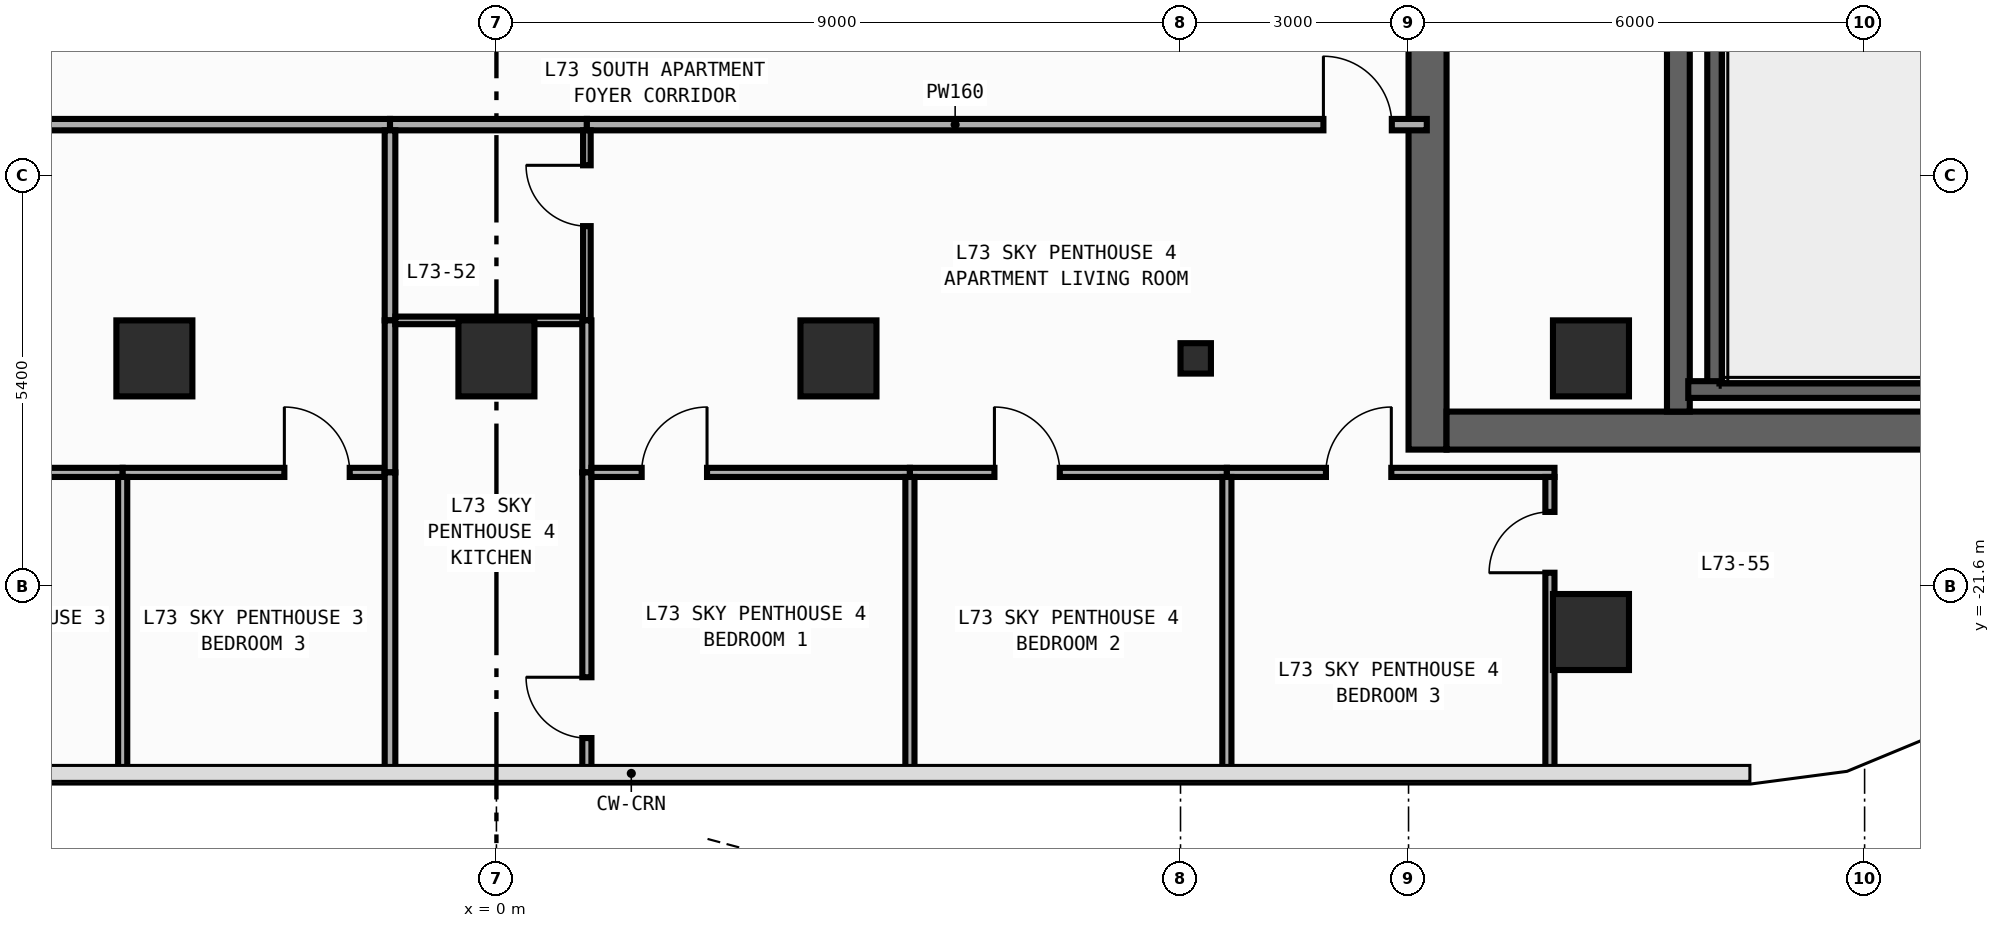
"""IFC4 building model, lengths in metres.
Left out: names, types, materials, properties, quantities, classifications, styles, units other than length and angle.
Written with IfcOpenShell. Run it as: python <this file> out.ifc"""

import sys

from ifc_helpers import new_model, si_unit, direction, frame, frame_2d, origin, origin_2d, place, context, subcontext, project, spatial, rectangle, circle, i_section, extrude, element, fill, save


model = new_model("IFC4")
c1 = context("Model", 3, precision=1e-05, world=origin(), true_north=direction((0.0, 1.0)))
c2 = subcontext(c1, "Body", "Model", "MODEL_VIEW")
j1 = project(units=[si_unit("LENGTHUNIT", "METRE"), si_unit("PLANEANGLEUNIT", "RADIAN")], contexts=[c1])
p1 = place(None, origin())
s1 = spatial("IfcSite", under=j1, at=p1, CompositionType="ELEMENT")
p2 = place(p1, origin())
s2 = spatial("IfcBuilding", under=s1, at=p2, CompositionType="ELEMENT")
p3 = place(p2, frame((0.0, 0.0, 304.2)))
s3 = spatial("IfcBuildingStorey", under=s2, at=p3, CompositionType="ELEMENT", Elevation=304.2)
p4 = place(p3, frame((12.25, -19.8, 0.0), z_axis=(0.0, 0.0, 1.0), x_axis=(0.0, 1.0, 0.0)))
e1 = element("IfcWall", 1, at=p4, inside=s3, PredefinedType="SHEAR", context=c2, shape_type="SweptSolid", body=[
    extrude(rectangle(XDim=27.0, YDim=0.5, at=frame_2d((13.5, 0.0))), origin(), (0.0, 0.0, 1.0), 3.54),
])
p5 = place(p4, frame((23.05, 0.0, 0.0)))
e2 = element("IfcOpeningElement", 2, at=p5, cuts=e1, PredefinedType="OPENING", context=c2, shape_type="SweptSolid", body=[
    extrude(rectangle(XDim=1.1, YDim=2.2, at=frame_2d((0.55, 1.1))), frame((0.0, 0.26, 0.0), z_axis=(0.0, -1.0, 0.0), x_axis=(1.0, 0.0, 0.0)), (0.0, 0.0, 1.0), 0.52),
])
p6 = place(p4, frame((19.85, 0.0, 0.0)))
e3 = element("IfcOpeningElement", 3, at=p6, cuts=e1, PredefinedType="OPENING", context=c2, shape_type="SweptSolid", body=[
    extrude(rectangle(XDim=1.1, YDim=2.2, at=frame_2d((0.55, 1.1))), frame((0.0, 0.26, 0.0), z_axis=(0.0, -1.0, 0.0), x_axis=(1.0, 0.0, 0.0)), (0.0, 0.0, 1.0), 0.52),
])
p7 = place(p4, frame((16.65, 0.0, 0.0)))
e4 = element("IfcOpeningElement", 4, at=p7, cuts=e1, PredefinedType="OPENING", context=c2, shape_type="SweptSolid", body=[
    extrude(rectangle(XDim=1.1, YDim=2.2, at=frame_2d((0.55, 1.1))), frame((0.0, 0.26, 0.0), z_axis=(0.0, -1.0, 0.0), x_axis=(1.0, 0.0, 0.0)), (0.0, 0.0, 1.0), 0.52),
])
p8 = place(p4, frame((10.175, 0.0, 0.0)))
e5 = element("IfcOpeningElement", 5, at=p8, cuts=e1, PredefinedType="OPENING", context=c2, shape_type="SweptSolid", body=[
    extrude(rectangle(XDim=0.85, YDim=2.1, at=frame_2d((0.425, 1.05))), frame((0.0, 0.26, 0.0), z_axis=(0.0, -1.0, 0.0), x_axis=(1.0, 0.0, 0.0)), (0.0, 0.0, 1.0), 0.52),
])
p9 = place(p4, frame((12.725, 0.0, 0.0)))
e6 = element("IfcOpeningElement", 6, at=p9, cuts=e1, PredefinedType="OPENING", context=c2, shape_type="SweptSolid", body=[
    extrude(rectangle(XDim=1.15, YDim=2.2, at=frame_2d((0.575, 1.1))), frame((0.0, 0.26, 0.0), z_axis=(0.0, -1.0, 0.0), x_axis=(1.0, 0.0, 0.0)), (0.0, 0.0, 1.0), 0.52),
])
p10 = place(p4, frame((25.125, 0.0, 0.0)))
e7 = element("IfcOpeningElement", 7, at=p10, cuts=e1, PredefinedType="OPENING", context=c2, shape_type="SweptSolid", body=[
    extrude(rectangle(XDim=0.85, YDim=2.1, at=frame_2d((0.425, 1.05))), frame((0.0, 0.26, 0.0), z_axis=(0.0, -1.0, 0.0), x_axis=(1.0, 0.0, 0.0)), (0.0, 0.0, 1.0), 0.52),
])
p11 = place(p3, frame((12.5, -19.55, 0.0), z_axis=(0.0, 0.0, 1.0), x_axis=(1.0, 0.0, 0.0)))
e8 = element("IfcWall", 8, at=p11, inside=s3, PredefinedType="SHEAR", context=c2, shape_type="SweptSolid", body=[
    extrude(rectangle(XDim=7.4, YDim=0.5, at=frame_2d((3.7, 0.0))), origin(), (0.0, 0.0, 1.0), 3.54),
])
p12 = place(p3, frame((15.55, -19.3, 0.0), z_axis=(0.0, 0.0, 1.0), x_axis=(0.0, 1.0, 0.0)))
e9 = element("IfcWall", 9, at=p12, inside=s3, PredefinedType="SHEAR", context=c2, shape_type="SweptSolid", body=[
    extrude(rectangle(XDim=26.0, YDim=0.3, at=frame_2d((13.0, 0.0))), origin(), (0.0, 0.0, 1.0), 3.54),
])
p13 = place(p12, frame((12.225, 0.0, 0.0)))
e10 = element("IfcOpeningElement", 10, at=p13, cuts=e9, PredefinedType="OPENING", context=c2, shape_type="SweptSolid", body=[
    extrude(rectangle(XDim=1.15, YDim=2.2, at=frame_2d((0.575, 1.1))), frame((0.0, 0.16, 0.0), z_axis=(0.0, -1.0, 0.0), x_axis=(1.0, 0.0, 0.0)), (0.0, 0.0, 1.0), 0.32),
])
p14 = place(p12, frame((24.625, 0.0, 0.0)))
e11 = element("IfcOpeningElement", 11, at=p14, cuts=e9, PredefinedType="OPENING", context=c2, shape_type="SweptSolid", body=[
    extrude(rectangle(XDim=0.85, YDim=2.1, at=frame_2d((0.425, 1.05))), frame((0.0, 0.16, 0.0), z_axis=(0.0, -1.0, 0.0), x_axis=(1.0, 0.0, 0.0)), (0.0, 0.0, 1.0), 0.32),
])
p15 = place(p3, frame((16.04, -19.01, 0.0), z_axis=(0.0, 0.0, 1.0), x_axis=(0.0, 1.0, 0.0)))
e12 = element("IfcWall", 12, at=p15, inside=s3, PredefinedType="SHEAR", context=c2, shape_type="SweptSolid", body=[
    extrude(rectangle(XDim=11.42, YDim=0.22, at=frame_2d((5.71, 0.0))), origin(), (0.0, 0.0, 1.0), 3.54),
])
p16 = place(p3, frame((15.68, -19.01, 0.0), z_axis=(0.0, 0.0, 1.0), x_axis=(1.0, 0.0, 0.0)))
e13 = element("IfcWall", 13, at=p16, inside=s3, PredefinedType="SHEAR", context=c2, shape_type="SweptSolid", body=[
    extrude(rectangle(XDim=4.24, YDim=0.22, at=frame_2d((2.12, 0.0))), origin(), (0.0, 0.0, 1.0), 3.54),
])
p17 = place(p3, frame((9.2, -18.6, 0.0), z_axis=(0.0, 0.0, 1.0), x_axis=(1.0, 0.0, 0.0)))
e14 = element("IfcColumn", 14, at=p17, inside=s3, PredefinedType="COLUMN", context=c2, shape_type="SweptSolid", body=[
    extrude(i_section(OverallWidth=0.4, OverallDepth=0.4, WebThickness=0.013, FlangeThickness=0.021, FilletRadius=0.022, at=origin_2d()), origin(), (0.0, 0.0, 1.0), 3.8),
])
for number, where, z_axis, x_axis in (
    (15, (14.4, -18.6, 0.0), (0.0, 0.0, 1.0), (1.0, 0.0, 0.0)),
    (16, (-4.5, -18.6, 0.0), (0.0, 0.0, 1.0), (1.0, 0.0, 0.0)),
    (17, (0.0, -18.6, 0.0), (0.0, 0.0, 1.0), (1.0, 0.0, 0.0)),
    (18, (4.5, -18.6, 0.0), (0.0, 0.0, 1.0), (1.0, 0.0, 0.0)),
    (19, (14.4, -22.2, 0.0), (0.0, 0.0, 1.0), (1.0, 0.0, 0.0)),
):
    element("IfcColumn", number, at=place(p3, frame(where, z_axis=z_axis, x_axis=x_axis)), inside=s3, PredefinedType="COLUMN", context=c2, shape_type="SweptSolid", body=[
        extrude(circle(Radius=0.5, at=origin_2d()), origin(), (0.0, 0.0, 1.0), 3.8),
    ])
p18 = place(p3, frame((-11.71, -15.525, 0.0), z_axis=(0.0, 0.0, 1.0), x_axis=(1.0, 0.0, 0.0)))
e20 = element("IfcWall", 20, at=p18, inside=s3, PredefinedType="PARTITIONING", context=c2, shape_type="SweptSolid", body=[
    extrude(rectangle(XDim=10.31, YDim=0.15, at=frame_2d((5.155, 0.0))), origin(), (0.0, 0.0, 1.0), 3.54),
])
p19 = place(p18, frame((4.099, 0.0, 0.0)))
e21 = element("IfcOpeningElement", 21, at=p19, cuts=e20, PredefinedType="OPENING", context=c2, shape_type="SweptSolid", body=[
    extrude(rectangle(XDim=0.9, YDim=2.15, at=frame_2d((0.45, 1.075))), frame((0.0, 0.085, 0.0), z_axis=(0.0, -1.0, 0.0), x_axis=(1.0, 0.0, 0.0)), (0.0, 0.0, 1.0), 0.17),
])
p20 = place(p3, frame((-1.4, -15.525, 0.0), z_axis=(0.0, 0.0, 1.0), x_axis=(1.0, 0.0, 0.0)))
e22 = element("IfcWall", 22, at=p20, inside=s3, PredefinedType="PARTITIONING", context=c2, shape_type="SweptSolid", body=[
    extrude(rectangle(XDim=2.59, YDim=0.15, at=frame_2d((1.295, 0.0))), origin(), (0.0, 0.0, 1.0), 3.54),
])
p21 = place(p3, frame((1.19, -15.525, 0.0), z_axis=(0.0, 0.0, 1.0), x_axis=(1.0, 0.0, 0.0)))
e23 = element("IfcWall", 23, at=p21, inside=s3, PredefinedType="PARTITIONING", context=c2, shape_type="SweptSolid", body=[
    extrude(rectangle(XDim=11.05, YDim=0.15, at=frame_2d((5.525, 0.0))), origin(), (0.0, 0.0, 1.0), 3.54),
])
p22 = place(p21, frame((9.69, 0.0, 0.0)))
e24 = element("IfcOpeningElement", 24, at=p22, cuts=e23, PredefinedType="OPENING", context=c2, shape_type="SweptSolid", body=[
    extrude(rectangle(XDim=0.9, YDim=2.15, at=frame_2d((0.45, 1.075))), frame((0.0, 0.085, 0.0), z_axis=(0.0, -1.0, 0.0), x_axis=(1.0, 0.0, 0.0)), (0.0, 0.0, 1.0), 0.17),
])
p23 = place(p3, frame((-8.273, -20.1, 0.0), z_axis=(0.0, 0.0, 1.0), x_axis=(1.0, 0.0, 0.0)))
e25 = element("IfcWall", 25, at=p23, inside=s3, PredefinedType="PARTITIONING", context=c2, shape_type="SweptSolid", body=[
    extrude(rectangle(XDim=3.356, YDim=0.12, at=frame_2d((1.678, 0.0))), origin(), (0.0, 0.0, 1.0), 3.54),
])
p24 = place(p23, frame((0.91, 0.0, 0.0)))
e26 = element("IfcOpeningElement", 26, at=p24, cuts=e25, PredefinedType="OPENING", context=c2, shape_type="SweptSolid", body=[
    extrude(rectangle(XDim=0.86, YDim=2.15, at=frame_2d((0.43, 1.075))), frame((0.0, 0.07, 0.0), z_axis=(0.0, -1.0, 0.0), x_axis=(1.0, 0.0, 0.0)), (0.0, 0.0, 1.0), 0.14),
])
p25 = place(p3, frame((-4.917, -20.1, 0.0), z_axis=(0.0, 0.0, 1.0), x_axis=(1.0, 0.0, 0.0)))
e27 = element("IfcWall", 27, at=p25, inside=s3, PredefinedType="PARTITIONING", context=c2, shape_type="SweptSolid", body=[
    extrude(rectangle(XDim=3.447, YDim=0.12, at=frame_2d((1.724, 0.0))), origin(), (0.0, 0.0, 1.0), 3.54),
])
p26 = place(p25, frame((2.127, 0.0, 0.0)))
e28 = element("IfcOpeningElement", 28, at=p26, cuts=e27, PredefinedType="OPENING", context=c2, shape_type="SweptSolid", body=[
    extrude(rectangle(XDim=0.86, YDim=2.15, at=frame_2d((0.43, 1.075))), frame((0.0, 0.07, 0.0), z_axis=(0.0, -1.0, 0.0), x_axis=(1.0, 0.0, 0.0)), (0.0, 0.0, 1.0), 0.14),
])
p27 = place(p3, frame((-1.4, -18.1, 0.0), z_axis=(0.0, 0.0, 1.0), x_axis=(0.0, 1.0, 0.0)))
e29 = element("IfcWall", 29, at=p27, inside=s3, PredefinedType="PARTITIONING", context=c2, shape_type="SweptSolid", body=[
    extrude(rectangle(XDim=2.5, YDim=0.14, at=frame_2d((1.25, 0.0))), origin(), (0.0, 0.0, 1.0), 3.54),
])
p28 = place(p3, frame((-1.4, -20.1, 0.0), z_axis=(0.0, 0.0, 1.0), x_axis=(0.0, 1.0, 0.0)))
e30 = element("IfcWall", 30, at=p28, inside=s3, PredefinedType="PARTITIONING", context=c2, shape_type="SweptSolid", body=[
    extrude(rectangle(XDim=2.0, YDim=0.14, at=frame_2d((1.0, 0.0))), origin(), (0.0, 0.0, 1.0), 3.54),
])
p29 = place(p3, frame((-4.917, -24.055, 0.0), z_axis=(0.0, 0.0, 1.0), x_axis=(0.0, 1.0, 0.0)))
e31 = element("IfcWall", 31, at=p29, inside=s3, PredefinedType="PARTITIONING", context=c2, shape_type="SweptSolid", body=[
    extrude(rectangle(XDim=3.895, YDim=0.12, at=frame_2d((1.948, 0.0))), origin(), (0.0, 0.0, 1.0), 3.54),
])
p30 = place(p3, frame((-1.4, -24.055, 0.0), z_axis=(0.0, 0.0, 1.0), x_axis=(0.0, 1.0, 0.0)))
e32 = element("IfcWall", 32, at=p30, inside=s3, PredefinedType="PARTITIONING", context=c2, shape_type="SweptSolid", body=[
    extrude(rectangle(XDim=3.955, YDim=0.14, at=frame_2d((1.978, 0.0))), origin(), (0.0, 0.0, 1.0), 3.54),
])
p31 = place(p3, frame((-1.33, -18.1, 0.0), z_axis=(0.0, 0.0, 1.0), x_axis=(1.0, 0.0, 0.0)))
e33 = element("IfcWall", 33, at=p31, inside=s3, PredefinedType="PARTITIONING", context=c2, shape_type="SweptSolid", body=[
    extrude(rectangle(XDim=2.47, YDim=0.1, at=frame_2d((1.235, 0.0))), origin(), (0.0, 0.0, 1.0), 3.54),
])
p32 = place(p3, frame((1.19, -18.1, 0.0), z_axis=(0.0, 0.0, 1.0), x_axis=(0.0, 1.0, 0.0)))
e34 = element("IfcWall", 34, at=p32, inside=s3, PredefinedType="PARTITIONING", context=c2, shape_type="SweptSolid", body=[
    extrude(rectangle(XDim=2.5, YDim=0.1, at=frame_2d((1.25, 0.0))), origin(), (0.0, 0.0, 1.0), 3.54),
])
p33 = place(p32, frame((1.24, 0.0, 0.0)))
e35 = element("IfcOpeningElement", 35, at=p33, cuts=e34, PredefinedType="OPENING", context=c2, shape_type="SweptSolid", body=[
    extrude(rectangle(XDim=0.8, YDim=2.1, at=frame_2d((0.4, 1.05))), frame((0.0, 0.06, 0.0), z_axis=(0.0, -1.0, 0.0), x_axis=(1.0, 0.0, 0.0)), (0.0, 0.0, 1.0), 0.12),
])
p34 = place(p3, frame((1.19, -20.1, 0.0), z_axis=(0.0, 0.0, 1.0), x_axis=(0.0, 1.0, 0.0)))
e36 = element("IfcWall", 36, at=p34, inside=s3, PredefinedType="PARTITIONING", context=c2, shape_type="SweptSolid", body=[
    extrude(rectangle(XDim=2.0, YDim=0.12, at=frame_2d((1.0, 0.0))), origin(), (0.0, 0.0, 1.0), 3.54),
])
p35 = place(p3, frame((1.19, -24.055, 0.0), z_axis=(0.0, 0.0, 1.0), x_axis=(0.0, 1.0, 0.0)))
e37 = element("IfcWall", 37, at=p35, inside=s3, PredefinedType="PARTITIONING", context=c2, shape_type="SweptSolid", body=[
    extrude(rectangle(XDim=3.955, YDim=0.12, at=frame_2d((1.978, 0.0))), origin(), (0.0, 0.0, 1.0), 3.54),
])
p36 = place(p35, frame((0.46, 0.0, 0.0)))
e38 = element("IfcOpeningElement", 38, at=p36, cuts=e37, PredefinedType="OPENING", context=c2, shape_type="SweptSolid", body=[
    extrude(rectangle(XDim=0.8, YDim=2.1, at=frame_2d((0.4, 1.05))), frame((0.0, 0.07, 0.0), z_axis=(0.0, -1.0, 0.0), x_axis=(1.0, 0.0, 0.0)), (0.0, 0.0, 1.0), 0.14),
])
p37 = place(p3, frame((1.25, -20.1, 0.0), z_axis=(0.0, 0.0, 1.0), x_axis=(1.0, 0.0, 0.0)))
e39 = element("IfcWall", 39, at=p37, inside=s3, PredefinedType="PARTITIONING", context=c2, shape_type="SweptSolid", body=[
    extrude(rectangle(XDim=4.19, YDim=0.12, at=frame_2d((2.095, 0.0))), origin(), (0.0, 0.0, 1.0), 3.54),
])
p38 = place(p37, frame((0.661, 0.0, 0.0)))
e40 = element("IfcOpeningElement", 40, at=p38, cuts=e39, PredefinedType="OPENING", context=c2, shape_type="SweptSolid", body=[
    extrude(rectangle(XDim=0.86, YDim=2.15, at=frame_2d((0.43, 1.075))), frame((0.0, 0.07, 0.0), z_axis=(0.0, -1.0, 0.0), x_axis=(1.0, 0.0, 0.0)), (0.0, 0.0, 1.0), 0.14),
])
p39 = place(p3, frame((5.44, -20.1, 0.0), z_axis=(0.0, 0.0, 1.0), x_axis=(1.0, 0.0, 0.0)))
e41 = element("IfcWall", 41, at=p39, inside=s3, PredefinedType="PARTITIONING", context=c2, shape_type="SweptSolid", body=[
    extrude(rectangle(XDim=4.17, YDim=0.12, at=frame_2d((2.085, 0.0))), origin(), (0.0, 0.0, 1.0), 3.54),
])
p40 = place(p39, frame((1.112, 0.0, 0.0)))
e42 = element("IfcOpeningElement", 42, at=p40, cuts=e41, PredefinedType="OPENING", context=c2, shape_type="SweptSolid", body=[
    extrude(rectangle(XDim=0.86, YDim=2.15, at=frame_2d((0.43, 1.075))), frame((0.0, 0.07, 0.0), z_axis=(0.0, -1.0, 0.0), x_axis=(1.0, 0.0, 0.0)), (0.0, 0.0, 1.0), 0.14),
])
p41 = place(p3, frame((9.61, -20.1, 0.0), z_axis=(0.0, 0.0, 1.0), x_axis=(1.0, 0.0, 0.0)))
e43 = element("IfcWall", 43, at=p41, inside=s3, PredefinedType="PARTITIONING", context=c2, shape_type="SweptSolid", body=[
    extrude(rectangle(XDim=4.31, YDim=0.12, at=frame_2d((2.155, 0.0))), origin(), (0.0, 0.0, 1.0), 3.54),
])
p42 = place(p41, frame((1.303, 0.0, 0.0)))
e44 = element("IfcOpeningElement", 44, at=p42, cuts=e43, PredefinedType="OPENING", context=c2, shape_type="SweptSolid", body=[
    extrude(rectangle(XDim=0.86, YDim=2.15, at=frame_2d((0.43, 1.075))), frame((0.0, 0.07, 0.0), z_axis=(0.0, -1.0, 0.0), x_axis=(1.0, 0.0, 0.0)), (0.0, 0.0, 1.0), 0.14),
])
p43 = place(p3, frame((13.86, -24.055, 0.0), z_axis=(0.0, 0.0, 1.0), x_axis=(0.0, 1.0, 0.0)))
e45 = element("IfcWall", 45, at=p43, inside=s3, PredefinedType="PARTITIONING", context=c2, shape_type="SweptSolid", body=[
    extrude(rectangle(XDim=3.895, YDim=0.12, at=frame_2d((1.948, 0.0))), origin(), (0.0, 0.0, 1.0), 3.54),
])
p44 = place(p43, frame((2.635, 0.0, 0.0)))
e46 = element("IfcOpeningElement", 46, at=p44, cuts=e45, PredefinedType="OPENING", context=c2, shape_type="SweptSolid", body=[
    extrude(rectangle(XDim=0.8, YDim=2.1, at=frame_2d((0.4, 1.05))), frame((0.0, 0.07, 0.0), z_axis=(0.0, -1.0, 0.0), x_axis=(1.0, 0.0, 0.0)), (0.0, 0.0, 1.0), 0.14),
])
for number, where, z_axis, x_axis in (
    (47, (5.44, -24.055, 0.0), (0.0, 0.0, 1.0), (0.0, 1.0, 0.0)),
    (48, (9.61, -24.055, 0.0), (0.0, 0.0, 1.0), (0.0, 1.0, 0.0)),
):
    element("IfcWall", number, at=place(p3, frame(where, z_axis=z_axis, x_axis=x_axis)), inside=s3, PredefinedType="PARTITIONING", context=c2, shape_type="SweptSolid", body=[
        extrude(rectangle(XDim=3.895, YDim=0.12, at=frame_2d((1.948, 0.0))), origin(), (0.0, 0.0, 1.0), 3.54),
    ])
p45 = place(p22, origin())
e49 = element("IfcDoor", 49, at=p45, inside=s3, OperationType="SINGLE_SWING_LEFT", PredefinedType="DOOR", context=c2, shape_type="SweptSolid", body=[
    extrude(rectangle(XDim=0.9, YDim=2.15, at=frame_2d((0.45, 1.075))), frame((0.0, 0.025, 0.0), z_axis=(0.0, -1.0, 0.0), x_axis=(1.0, 0.0, 0.0)), (0.0, 0.0, 1.0), 0.05),
])
fill(e24, e49)
p46 = place(p26, origin())
e50 = element("IfcDoor", 50, at=p46, inside=s3, OperationType="SINGLE_SWING_LEFT", PredefinedType="DOOR", context=c2, shape_type="SweptSolid", body=[
    extrude(rectangle(XDim=0.86, YDim=2.15, at=frame_2d((0.43, 1.075))), frame((0.0, 0.025, 0.0), z_axis=(0.0, -1.0, 0.0), x_axis=(1.0, 0.0, 0.0)), (0.0, 0.0, 1.0), 0.05),
])
fill(e28, e50)
p47 = place(p33, origin())
e51 = element("IfcDoor", 51, at=p47, inside=s3, OperationType="SINGLE_SWING_RIGHT", PredefinedType="DOOR", context=c2, shape_type="SweptSolid", body=[
    extrude(rectangle(XDim=0.8, YDim=2.1, at=frame_2d((0.4, 1.05))), frame((0.0, 0.025, 0.0), z_axis=(0.0, -1.0, 0.0), x_axis=(1.0, 0.0, 0.0)), (0.0, 0.0, 1.0), 0.05),
])
fill(e35, e51)
p48 = place(p38, origin())
e52 = element("IfcDoor", 52, at=p48, inside=s3, OperationType="SINGLE_SWING_RIGHT", PredefinedType="DOOR", context=c2, shape_type="SweptSolid", body=[
    extrude(rectangle(XDim=0.86, YDim=2.15, at=frame_2d((0.43, 1.075))), frame((0.0, 0.025, 0.0), z_axis=(0.0, -1.0, 0.0), x_axis=(1.0, 0.0, 0.0)), (0.0, 0.0, 1.0), 0.05),
])
fill(e40, e52)
p49 = place(p40, origin())
e53 = element("IfcDoor", 53, at=p49, inside=s3, OperationType="SINGLE_SWING_LEFT", PredefinedType="DOOR", context=c2, shape_type="SweptSolid", body=[
    extrude(rectangle(XDim=0.86, YDim=2.15, at=frame_2d((0.43, 1.075))), frame((0.0, 0.025, 0.0), z_axis=(0.0, -1.0, 0.0), x_axis=(1.0, 0.0, 0.0)), (0.0, 0.0, 1.0), 0.05),
])
fill(e42, e53)
p50 = place(p42, origin())
e54 = element("IfcDoor", 54, at=p50, inside=s3, OperationType="SINGLE_SWING_RIGHT", PredefinedType="DOOR", context=c2, shape_type="SweptSolid", body=[
    extrude(rectangle(XDim=0.86, YDim=2.15, at=frame_2d((0.43, 1.075))), frame((0.0, 0.025, 0.0), z_axis=(0.0, -1.0, 0.0), x_axis=(1.0, 0.0, 0.0)), (0.0, 0.0, 1.0), 0.05),
])
fill(e44, e54)
p51 = place(p36, origin())
e55 = element("IfcDoor", 55, at=p51, inside=s3, OperationType="SINGLE_SWING_RIGHT", PredefinedType="DOOR", context=c2, shape_type="SweptSolid", body=[
    extrude(rectangle(XDim=0.8, YDim=2.1, at=frame_2d((0.4, 1.05))), frame((0.0, 0.025, 0.0), z_axis=(0.0, -1.0, 0.0), x_axis=(1.0, 0.0, 0.0)), (0.0, 0.0, 1.0), 0.05),
])
fill(e38, e55)
p52 = place(p44, origin())
e56 = element("IfcDoor", 56, at=p52, inside=s3, OperationType="SINGLE_SWING_LEFT", PredefinedType="DOOR", context=c2, shape_type="SweptSolid", body=[
    extrude(rectangle(XDim=0.8, YDim=2.1, at=frame_2d((0.4, 1.05))), frame((0.0, 0.025, 0.0), z_axis=(0.0, -1.0, 0.0), x_axis=(1.0, 0.0, 0.0)), (0.0, 0.0, 1.0), 0.05),
])
fill(e46, e56)
save(model, sys.argv[1])
